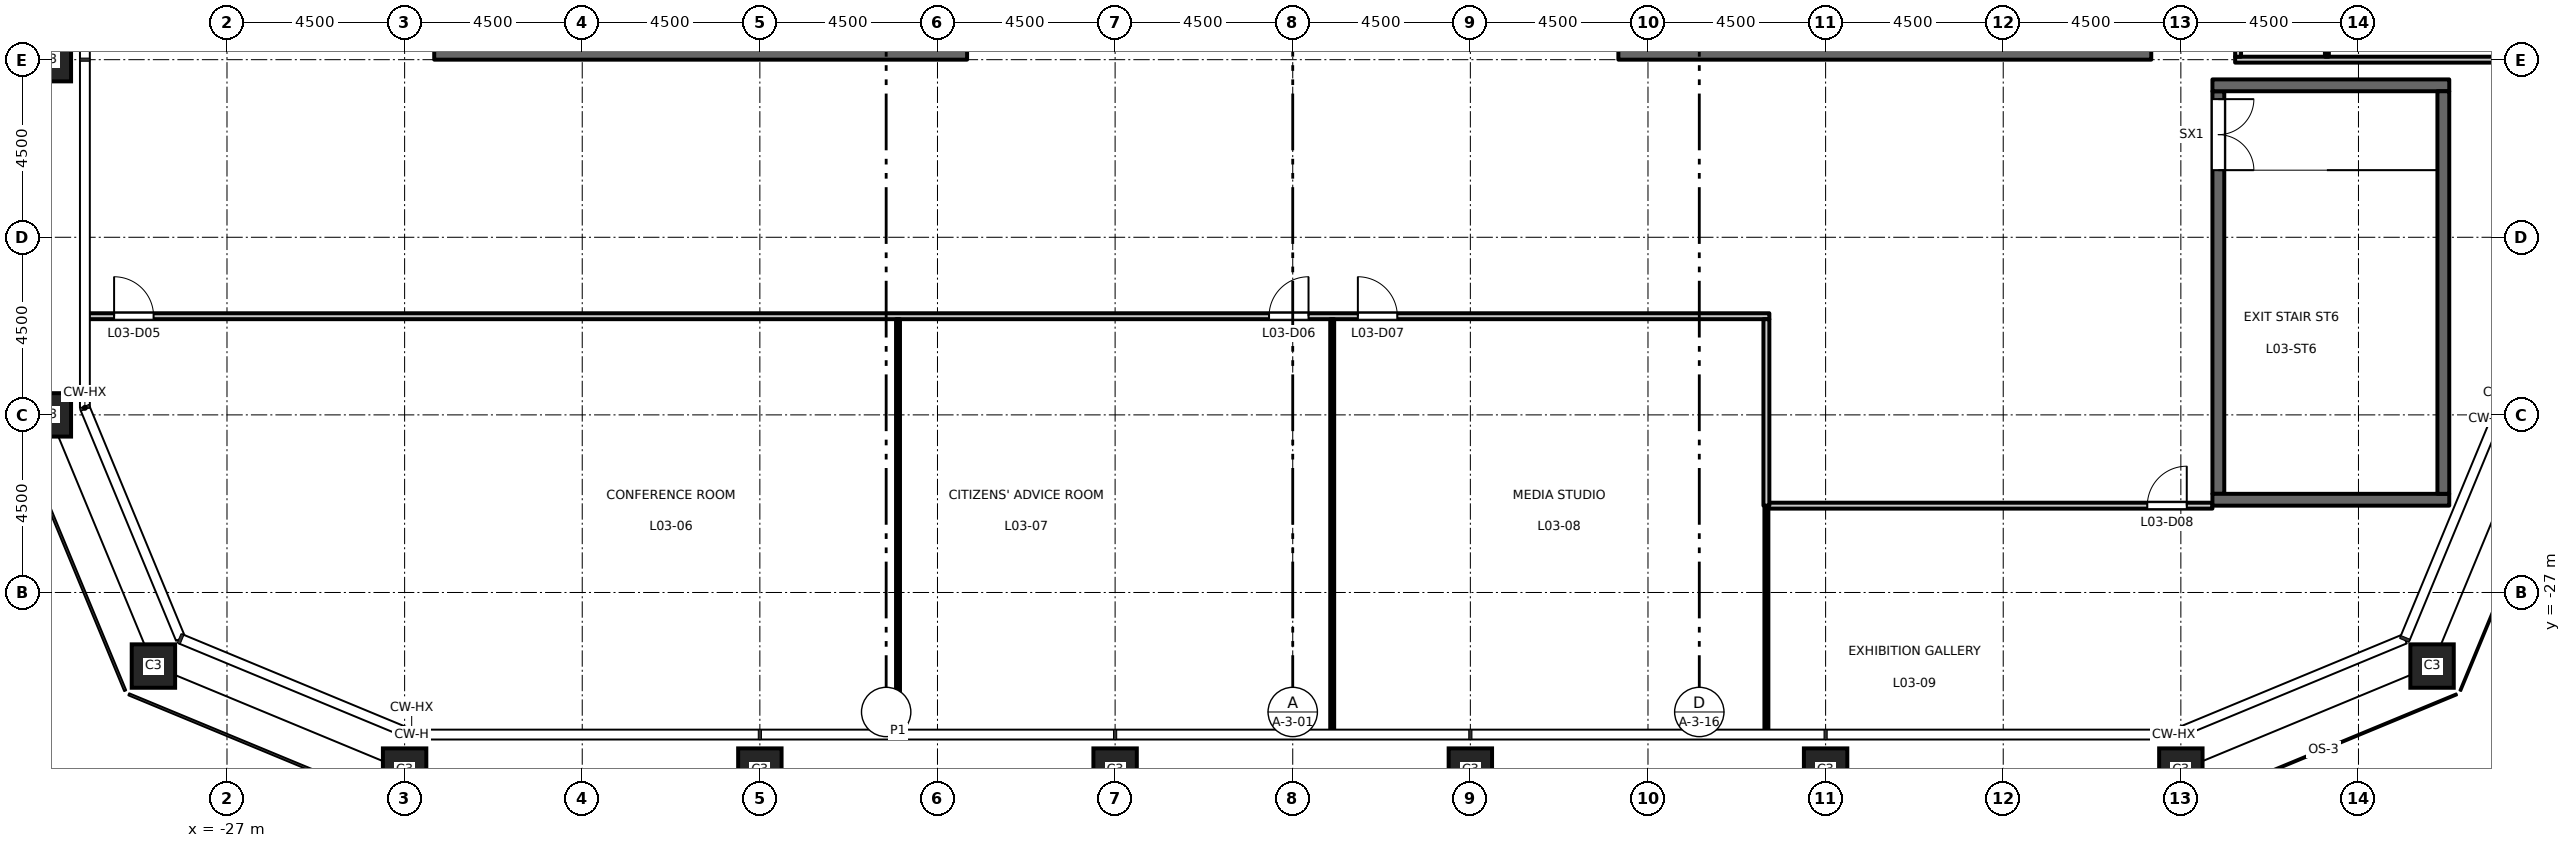
"""IFC4 building model, lengths in metres.
Left out: names, types, materials, properties, quantities, classifications, styles, units other than length and angle.
Written with IfcOpenShell. Run it as: python <this file> out.ifc"""

import sys

from ifc_helpers import new_model, si_unit, direction, frame, frame_2d, origin, origin_2d, place, context, subcontext, project, spatial, rectangle, hollow_rectangle, extrude, element, fill, save


model = new_model("IFC4")
c1 = context("Model", 3, precision=1e-05, world=origin(), true_north=direction((0.0, 1.0)))
c2 = subcontext(c1, "Body", "Model", "MODEL_VIEW")
j1 = project(units=[si_unit("LENGTHUNIT", "METRE"), si_unit("PLANEANGLEUNIT", "RADIAN")], contexts=[c1])
p1 = place(None, origin())
s1 = spatial("IfcSite", under=j1, at=p1, CompositionType="ELEMENT")
p2 = place(p1, origin())
s2 = spatial("IfcBuilding", under=s1, at=p2, CompositionType="ELEMENT")
p3 = place(p2, frame((0.0, 0.0, 17.2)))
s3 = spatial("IfcBuildingStorey", under=s2, at=p3, CompositionType="ELEMENT", Elevation=17.2)
for number, where, z_axis, x_axis in (
    (1, (-22.5, -31.5, 0.0), (0.0, 0.0, 1.0), (1.0, 0.0, 0.0)),
    (2, (-13.5, -31.5, 0.0), (0.0, 0.0, 1.0), (1.0, 0.0, 0.0)),
    (3, (-4.5, -31.5, 0.0), (0.0, 0.0, 1.0), (1.0, 0.0, 0.0)),
    (4, (4.5, -31.5, 0.0), (0.0, 0.0, 1.0), (1.0, 0.0, 0.0)),
    (5, (13.5, -31.5, 0.0), (0.0, 0.0, 1.0), (1.0, 0.0, 0.0)),
    (6, (22.5, -31.5, 0.0), (0.0, 0.0, 1.0), (1.0, 0.0, 0.0)),
    (7, (28.864, -28.864, 0.0), (0.0, 0.0, 1.0), (1.0, 0.0, 0.0)),
    (8, (-31.5, -13.5, 0.0), (0.0, 0.0, 1.0), (1.0, 0.0, 0.0)),
    (9, (-31.5, -22.5, 0.0), (0.0, 0.0, 1.0), (1.0, 0.0, 0.0)),
    (10, (-28.864, -28.864, 0.0), (0.0, 0.0, 1.0), (1.0, 0.0, 0.0)),
):
    element("IfcColumn", number, at=place(p3, frame(where, z_axis=z_axis, x_axis=x_axis)), inside=s3, PredefinedType="COLUMN", context=c2, shape_type="SweptSolid", body=[
        extrude(hollow_rectangle(XDim=1.1, YDim=1.1, WallThickness=0.07, at=origin_2d()), origin(), (0.0, 0.0, 1.0), 5.0),
    ])
for number, where, z_axis, x_axis in (
    (11, (-8.25, -13.25, 0.0), (0.0, 0.0, 1.0), (-1.0, 0.0, 0.0)),
    (12, (8.25, -13.25, 0.0), (0.0, 0.0, 1.0), (1.0, 0.0, 0.0)),
):
    element("IfcWall", number, at=place(p3, frame(where, z_axis=z_axis, x_axis=x_axis)), inside=s3, PredefinedType="SHEAR", context=c2, shape_type="SweptSolid", body=[
        extrude(rectangle(XDim=13.5, YDim=0.5, at=frame_2d((6.75, 0.0))), origin(), (0.0, 0.0, 1.0), 4.85),
    ])
p4 = place(p3, frame((23.45, -14.3, 0.0), z_axis=(0.0, 0.0, 1.0), x_axis=(0.0, -1.0, 0.0)))
e13 = element("IfcWall", 13, at=p4, inside=s3, PredefinedType="SHEAR", context=c2, shape_type="SweptSolid", body=[
    extrude(rectangle(XDim=10.2, YDim=0.3, at=frame_2d((5.1, 0.0))), origin(), (0.0, 0.0, 1.0), 4.85),
])
p5 = place(p4, frame((0.2, 0.0, 0.0)))
e14 = element("IfcOpeningElement", 14, at=p5, cuts=e13, PredefinedType="OPENING", context=c2, shape_type="SweptSolid", body=[
    extrude(rectangle(XDim=1.8, YDim=2.1, at=frame_2d((0.9, 1.05))), frame((0.0, 0.16, 0.0), z_axis=(0.0, -1.0, 0.0), x_axis=(1.0, 0.0, 0.0)), (0.0, 0.0, 1.0), 0.32),
])
for number, where, z_axis, x_axis in (
    (15, (29.3, -24.65, 0.0), (0.0, 0.0, 1.0), (-1.0, 0.0, 0.0)),
    (16, (29.3, -14.15, 0.0), (0.0, 0.0, 1.0), (-1.0, 0.0, 0.0)),
):
    element("IfcWall", number, at=place(p3, frame(where, z_axis=z_axis, x_axis=x_axis)), inside=s3, PredefinedType="SHEAR", context=c2, shape_type="SweptSolid", body=[
        extrude(rectangle(XDim=6.0, YDim=0.3, at=frame_2d((3.0, 0.0))), origin(), (0.0, 0.0, 1.0), 4.85),
    ])
p6 = place(p3, frame((29.15, -14.3, 0.0), z_axis=(0.0, 0.0, 1.0), x_axis=(0.0, -1.0, 0.0)))
e17 = element("IfcWall", 17, at=p6, inside=s3, PredefinedType="SHEAR", context=c2, shape_type="SweptSolid", body=[
    extrude(rectangle(XDim=10.2, YDim=0.3, at=frame_2d((5.1, 0.0))), origin(), (0.0, 0.0, 1.0), 4.85),
])
p7 = place(p3, frame((12.05, -24.8, 0.0), z_axis=(0.0, 0.0, 1.0), x_axis=(1.0, 0.0, 0.0)))
e18 = element("IfcWall", 18, at=p7, inside=s3, PredefinedType="PARTITIONING", context=c2, shape_type="SweptSolid", body=[
    extrude(rectangle(XDim=11.25, YDim=0.15, at=frame_2d((5.625, 0.0))), origin(), (0.0, 0.0, 1.0), 4.85),
])
p8 = place(p7, frame((9.6, 0.0, 0.0)))
e19 = element("IfcOpeningElement", 19, at=p8, cuts=e18, PredefinedType="OPENING", context=c2, shape_type="SweptSolid", body=[
    extrude(rectangle(XDim=1.0, YDim=2.1, at=frame_2d((0.5, 1.05))), frame((0.0, 0.085, 0.0), z_axis=(0.0, -1.0, 0.0), x_axis=(1.0, 0.0, 0.0)), (0.0, 0.0, 1.0), 0.17),
])
p9 = place(p3, frame((-30.51, -20.0, 0.0), z_axis=(0.0, 0.0, 1.0), x_axis=(1.0, 0.0, 0.0)))
e20 = element("IfcWall", 20, at=p9, inside=s3, PredefinedType="PARTITIONING", context=c2, shape_type="SweptSolid", body=[
    extrude(rectangle(XDim=42.585, YDim=0.15, at=frame_2d((21.292, 0.0))), origin(), (0.0, 0.0, 1.0), 4.85),
])
p10 = place(p9, frame((0.65, 0.0, 0.0)))
e21 = element("IfcOpeningElement", 21, at=p10, cuts=e20, PredefinedType="OPENING", context=c2, shape_type="SweptSolid", body=[
    extrude(rectangle(XDim=1.0, YDim=2.1, at=frame_2d((0.5, 1.05))), frame((0.0, 0.085, 0.0), z_axis=(0.0, -1.0, 0.0), x_axis=(1.0, 0.0, 0.0)), (0.0, 0.0, 1.0), 0.17),
])
p11 = place(p9, frame((29.91, 0.0, 0.0)))
e22 = element("IfcOpeningElement", 22, at=p11, cuts=e20, PredefinedType="OPENING", context=c2, shape_type="SweptSolid", body=[
    extrude(rectangle(XDim=1.0, YDim=2.1, at=frame_2d((0.5, 1.05))), frame((0.0, 0.085, 0.0), z_axis=(0.0, -1.0, 0.0), x_axis=(1.0, 0.0, 0.0)), (0.0, 0.0, 1.0), 0.17),
])
p12 = place(p9, frame((32.16, 0.0, 0.0)))
e23 = element("IfcOpeningElement", 23, at=p12, cuts=e20, PredefinedType="OPENING", context=c2, shape_type="SweptSolid", body=[
    extrude(rectangle(XDim=1.0, YDim=2.1, at=frame_2d((0.5, 1.05))), frame((0.0, 0.085, 0.0), z_axis=(0.0, -1.0, 0.0), x_axis=(1.0, 0.0, 0.0)), (0.0, 0.0, 1.0), 0.17),
])
p13 = place(p3, frame((23.875, -13.5, 0.0), z_axis=(0.0, 0.0, 1.0), x_axis=(1.0, 0.0, 0.0)))
e24 = element("IfcWall", 24, at=p13, inside=s3, PredefinedType="PARTITIONING", context=c2, shape_type="SweptSolid", body=[
    extrude(rectangle(XDim=6.635, YDim=0.15, at=frame_2d((3.317, 0.0))), origin(), (0.0, 0.0, 1.0), 3.85),
])
for number, where, z_axis, x_axis in (
    (25, (-10.0, -30.51, 0.0), (0.0, 0.0, 1.0), (0.0, 1.0, 0.0)),
    (26, (1.0, -30.51, 0.0), (0.0, 0.0, 1.0), (0.0, 1.0, 0.0)),
):
    element("IfcWall", number, at=place(p3, frame(where, z_axis=z_axis, x_axis=x_axis)), inside=s3, PredefinedType="PARTITIONING", context=c2, shape_type="SweptSolid", body=[
        extrude(rectangle(XDim=10.435, YDim=0.1, at=frame_2d((5.218, 0.0))), origin(), (0.0, 0.0, 1.0), 4.85),
    ])
p14 = place(p3, frame((12.0, -30.51, 0.0), z_axis=(0.0, 0.0, 1.0), x_axis=(0.0, 1.0, 0.0)))
e27 = element("IfcWall", 27, at=p14, inside=s3, PredefinedType="PARTITIONING", context=c2, shape_type="SweptSolid", body=[
    extrude(rectangle(XDim=5.71, YDim=0.1, at=frame_2d((2.855, 0.0))), origin(), (0.0, 0.0, 1.0), 4.85),
])
p15 = place(p3, frame((12.0, -24.8, 0.0), z_axis=(0.0, 0.0, 1.0), x_axis=(0.0, 1.0, 0.0)))
e28 = element("IfcWall", 28, at=p15, inside=s3, PredefinedType="PARTITIONING", context=c2, shape_type="SweptSolid", body=[
    extrude(rectangle(XDim=4.725, YDim=0.15, at=frame_2d((2.363, 0.0))), origin(), (0.0, 0.0, 1.0), 4.85),
])
p16 = place(p3, frame((23.95, -13.425, 0.0), z_axis=(0.0, 0.0, 1.0), x_axis=(0.0, 1.0, 0.0)))
e29 = element("IfcWall", 29, at=p16, inside=s3, PredefinedType="PARTITIONING", context=c2, shape_type="SweptSolid", body=[
    extrude(rectangle(XDim=10.35, YDim=0.15, at=frame_2d((5.175, 0.0))), origin(), (0.0, 0.0, 1.0), 4.85),
])
p17 = place(p16, frame((8.825, 0.0, 0.0)))
e30 = element("IfcOpeningElement", 30, at=p17, cuts=e29, PredefinedType="OPENING", context=c2, shape_type="SweptSolid", body=[
    extrude(rectangle(XDim=1.0, YDim=2.1, at=frame_2d((0.5, 1.05))), frame((0.0, 0.085, 0.0), z_axis=(0.0, -1.0, 0.0), x_axis=(1.0, 0.0, 0.0)), (0.0, 0.0, 1.0), 0.17),
])
p18 = place(p3, frame((26.2, -13.425, 0.0), z_axis=(0.0, 0.0, 1.0), x_axis=(0.0, 1.0, 0.0)))
e31 = element("IfcWall", 31, at=p18, inside=s3, PredefinedType="PARTITIONING", context=c2, shape_type="SweptSolid", body=[
    extrude(rectangle(XDim=10.35, YDim=0.1, at=frame_2d((5.175, 0.0))), origin(), (0.0, 0.0, 1.0), 4.85),
])
p19 = place(p5, origin())
e32 = element("IfcDoor", 32, at=p19, inside=s3, OperationType="DOUBLE_DOOR_SINGLE_SWING", PredefinedType="DOOR", context=c2, shape_type="SweptSolid", body=[
    extrude(rectangle(XDim=1.8, YDim=2.1, at=frame_2d((0.9, 1.05))), frame((0.0, 0.025, 0.0), z_axis=(0.0, -1.0, 0.0), x_axis=(1.0, 0.0, 0.0)), (0.0, 0.0, 1.0), 0.05),
])
fill(e14, e32)
p20 = place(p10, origin())
e33 = element("IfcDoor", 33, at=p20, inside=s3, OperationType="SINGLE_SWING_LEFT", PredefinedType="DOOR", context=c2, shape_type="SweptSolid", body=[
    extrude(rectangle(XDim=1.0, YDim=2.1, at=frame_2d((0.5, 1.05))), frame((0.0, 0.025, 0.0), z_axis=(0.0, -1.0, 0.0), x_axis=(1.0, 0.0, 0.0)), (0.0, 0.0, 1.0), 0.05),
])
fill(e21, e33)
p21 = place(p11, origin())
e34 = element("IfcDoor", 34, at=p21, inside=s3, OperationType="SINGLE_SWING_RIGHT", PredefinedType="DOOR", context=c2, shape_type="SweptSolid", body=[
    extrude(rectangle(XDim=1.0, YDim=2.1, at=frame_2d((0.5, 1.05))), frame((0.0, 0.025, 0.0), z_axis=(0.0, -1.0, 0.0), x_axis=(1.0, 0.0, 0.0)), (0.0, 0.0, 1.0), 0.05),
])
fill(e22, e34)
p22 = place(p12, origin())
e35 = element("IfcDoor", 35, at=p22, inside=s3, OperationType="SINGLE_SWING_LEFT", PredefinedType="DOOR", context=c2, shape_type="SweptSolid", body=[
    extrude(rectangle(XDim=1.0, YDim=2.1, at=frame_2d((0.5, 1.05))), frame((0.0, 0.025, 0.0), z_axis=(0.0, -1.0, 0.0), x_axis=(1.0, 0.0, 0.0)), (0.0, 0.0, 1.0), 0.05),
])
fill(e23, e35)
p23 = place(p8, origin())
e36 = element("IfcDoor", 36, at=p23, inside=s3, OperationType="SINGLE_SWING_RIGHT", PredefinedType="DOOR", context=c2, shape_type="SweptSolid", body=[
    extrude(rectangle(XDim=1.0, YDim=2.1, at=frame_2d((0.5, 1.05))), frame((0.0, 0.025, 0.0), z_axis=(0.0, -1.0, 0.0), x_axis=(1.0, 0.0, 0.0)), (0.0, 0.0, 1.0), 0.05),
])
fill(e19, e36)
save(model, sys.argv[1])
